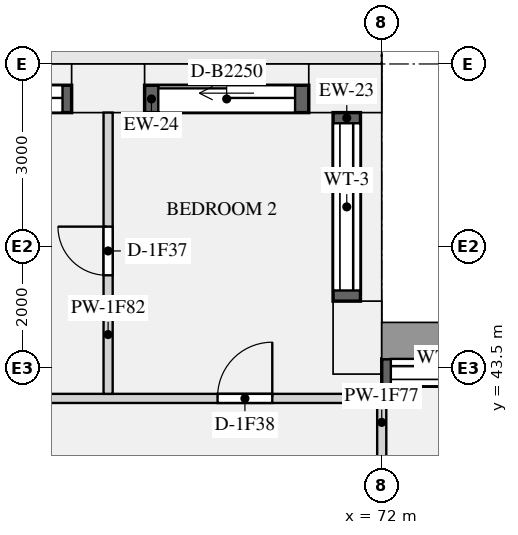
"""IFC4 building model, lengths in metres.
Left out: names, types, materials, properties, quantities, classifications, styles, units other than length and angle.
Written with IfcOpenShell. Run it as: python <this file> out.ifc"""

import sys

from ifc_helpers import new_model, si_unit, direction, frame, frame_2d, origin, origin_2d, place, context, subcontext, project, spatial, rectangle, extrude, element, fill, save


model = new_model("IFC4")
c1 = context("Model", 3, precision=1e-05, world=origin(), true_north=direction((0.0, 1.0)))
c2 = subcontext(c1, "Body", "Model", "MODEL_VIEW")
j1 = project(units=[si_unit("LENGTHUNIT", "METRE"), si_unit("PLANEANGLEUNIT", "RADIAN")], contexts=[c1])
p1 = place(None, origin())
s1 = spatial("IfcSite", under=j1, at=p1, CompositionType="ELEMENT")
p2 = place(p1, origin())
s2 = spatial("IfcBuilding", under=s1, at=p2, CompositionType="ELEMENT")
p3 = place(p2, frame((0.0, 0.0, 60.45)))
s3 = spatial("IfcBuildingStorey", under=s2, at=p3, CompositionType="ELEMENT", Elevation=60.45)
for number, where, z_axis, x_axis in (
    (1, (71.6, 44.0, 0.0), (0.0, 0.0, 1.0), (0.0, 1.0, 0.0)),
    (2, (71.4, 48.1, 0.0), (0.0, 0.0, 1.0), (-1.0, 0.0, 0.0)),
    (3, (67.5, 48.1, 0.0), (0.0, 0.0, 1.0), (-1.0, 0.0, 0.0)),
):
    element("IfcColumn", number, at=place(p3, frame(where, z_axis=z_axis, x_axis=x_axis)), inside=s3, PredefinedType="USERDEFINED", context=c2, shape_type="SweptSolid", body=[
        extrude(rectangle(XDim=1.2, YDim=0.8, at=origin_2d()), origin(), (0.0, 0.0, 1.0), 3.15),
    ])
p4 = place(p3, frame((75.3, 43.425, 0.9), z_axis=(0.0, 0.0, 1.0), x_axis=(-1.0, 0.0, 0.0)))
e4 = element("IfcWall", 4, at=p4, inside=s3, PredefinedType="SOLIDWALL", context=c2, shape_type="SweptSolid", body=[
    extrude(rectangle(XDim=3.3, YDim=0.45, at=frame_2d((1.65, 0.0))), origin(), (0.0, 0.0, 1.0), 1.93),
])
p5 = place(p4, frame((0.15, 0.0, 0.15)))
e5 = element("IfcOpeningElement", 5, at=p5, cuts=e4, PredefinedType="OPENING", context=c2, shape_type="SweptSolid", body=[
    extrude(rectangle(XDim=3.0, YDim=1.5, at=frame_2d((1.5, 0.75))), frame((0.0, 0.235, 0.0), z_axis=(0.0, -1.0, 0.0), x_axis=(1.0, 0.0, 0.0)), (0.0, 0.0, 1.0), 0.47),
])
p6 = place(p3, frame((71.425, 44.6, 0.9), z_axis=(0.0, 0.0, 1.0), x_axis=(0.0, 1.0, 0.0)))
e6 = element("IfcWall", 6, at=p6, inside=s3, PredefinedType="SOLIDWALL", context=c2, shape_type="SweptSolid", body=[
    extrude(rectangle(XDim=3.1, YDim=0.45, at=frame_2d((1.55, 0.0))), origin(), (0.0, 0.0, 1.0), 1.93),
])
p7 = place(p6, frame((0.175, 0.0, 0.15)))
e7 = element("IfcOpeningElement", 7, at=p7, cuts=e6, PredefinedType="OPENING", context=c2, shape_type="SweptSolid", body=[
    extrude(rectangle(XDim=2.75, YDim=1.5, at=frame_2d((1.375, 0.75))), frame((0.0, 0.235, 0.0), z_axis=(0.0, -1.0, 0.0), x_axis=(1.0, 0.0, 0.0)), (0.0, 0.0, 1.0), 0.47),
])
p8 = place(p3, frame((70.8, 47.925, 0.0), z_axis=(0.0, 0.0, 1.0), x_axis=(-1.0, 0.0, 0.0)))
e8 = element("IfcWall", 8, at=p8, inside=s3, PredefinedType="SOLIDWALL", context=c2, shape_type="SweptSolid", body=[
    extrude(rectangle(XDim=2.7, YDim=0.45, at=frame_2d((1.35, 0.0))), origin(), (0.0, 0.0, 1.0), 2.83),
])
p9 = place(p8, frame((0.225, 0.0, 0.0)))
e9 = element("IfcOpeningElement", 9, at=p9, cuts=e8, PredefinedType="OPENING", context=c2, shape_type="SweptSolid", body=[
    extrude(rectangle(XDim=2.25, YDim=2.3, at=frame_2d((1.125, 1.15))), frame((0.0, 0.235, 0.0), z_axis=(0.0, -1.0, 0.0), x_axis=(1.0, 0.0, 0.0)), (0.0, 0.0, 1.0), 0.47),
])
p10 = place(p3, frame((66.9, 47.925, 0.0), z_axis=(0.0, 0.0, 1.0), x_axis=(-1.0, 0.0, 0.0)))
e10 = element("IfcWall", 10, at=p10, inside=s3, PredefinedType="SOLIDWALL", context=c2, shape_type="SweptSolid", body=[
    extrude(rectangle(XDim=3.3, YDim=0.45, at=frame_2d((1.65, 0.0))), origin(), (0.0, 0.0, 1.0), 2.83),
])
p11 = place(p10, frame((0.15, 0.0, 0.0)))
e11 = element("IfcOpeningElement", 11, at=p11, cuts=e10, PredefinedType="OPENING", context=c2, shape_type="SweptSolid", body=[
    extrude(rectangle(XDim=3.0, YDim=2.3, at=frame_2d((1.5, 1.15))), frame((0.0, 0.235, 0.0), z_axis=(0.0, -1.0, 0.0), x_axis=(1.0, 0.0, 0.0)), (0.0, 0.0, 1.0), 0.47),
])
p12 = place(p3, frame((53.925, 43.0, 0.0), z_axis=(0.0, 0.0, 1.0), x_axis=(1.0, 0.0, 0.0)))
e12 = element("IfcWall", 12, at=p12, inside=s3, PredefinedType="PARTITIONING", context=c2, shape_type="SweptSolid", body=[
    extrude(rectangle(XDim=18.0, YDim=0.15, at=frame_2d((9.0, 0.0))), origin(), (0.0, 0.0, 1.0), 2.83),
])
p13 = place(p12, frame((15.375, 0.0, 0.0)))
e13 = element("IfcOpeningElement", 13, at=p13, cuts=e12, PredefinedType="OPENING", context=c2, shape_type="SweptSolid", body=[
    extrude(rectangle(XDim=0.9, YDim=2.1, at=frame_2d((0.45, 1.05))), frame((0.0, 0.085, 0.0), z_axis=(0.0, -1.0, 0.0), x_axis=(1.0, 0.0, 0.0)), (0.0, 0.0, 1.0), 0.17),
])
p14 = place(p12, frame((4.125, 0.0, 0.0)))
e14 = element("IfcOpeningElement", 14, at=p14, cuts=e12, PredefinedType="OPENING", context=c2, shape_type="SweptSolid", body=[
    extrude(rectangle(XDim=0.9, YDim=2.1, at=frame_2d((0.45, 1.05))), frame((0.0, 0.085, 0.0), z_axis=(0.0, -1.0, 0.0), x_axis=(1.0, 0.0, 0.0)), (0.0, 0.0, 1.0), 0.17),
])
p15 = place(p3, frame((72.0, 40.2, 0.0), z_axis=(0.0, 0.0, 1.0), x_axis=(0.0, 1.0, 0.0)))
e15 = element("IfcWall", 15, at=p15, inside=s3, PredefinedType="PARTITIONING", context=c2, shape_type="SweptSolid", body=[
    extrude(rectangle(XDim=3.0, YDim=0.15, at=frame_2d((1.5, 0.0))), origin(), (0.0, 0.0, 1.0), 2.83),
])
p16 = place(p15, frame((0.912, 0.0, 0.0)))
e16 = element("IfcOpeningElement", 16, at=p16, cuts=e15, PredefinedType="OPENING", context=c2, shape_type="SweptSolid", body=[
    extrude(rectangle(XDim=0.9, YDim=2.1, at=frame_2d((0.45, 1.05))), frame((0.0, 0.085, 0.0), z_axis=(0.0, -1.0, 0.0), x_axis=(1.0, 0.0, 0.0)), (0.0, 0.0, 1.0), 0.17),
])
p17 = place(p3, frame((67.5, 43.075, 0.0), z_axis=(0.0, 0.0, 1.0), x_axis=(0.0, 1.0, 0.0)))
e17 = element("IfcWall", 17, at=p17, inside=s3, PredefinedType="PARTITIONING", context=c2, shape_type="SweptSolid", body=[
    extrude(rectangle(XDim=4.625, YDim=0.15, at=frame_2d((2.312, 0.0))), origin(), (0.0, 0.0, 1.0), 2.83),
])
p18 = place(p17, frame((1.95, 0.0, 0.0)))
e18 = element("IfcOpeningElement", 18, at=p18, cuts=e17, PredefinedType="OPENING", context=c2, shape_type="SweptSolid", body=[
    extrude(rectangle(XDim=0.8, YDim=2.1, at=frame_2d((0.4, 1.05))), frame((0.0, 0.085, 0.0), z_axis=(0.0, -1.0, 0.0), x_axis=(1.0, 0.0, 0.0)), (0.0, 0.0, 1.0), 0.17),
])
p19 = place(p5, origin())
e19 = element("IfcWindow", 19, at=p19, inside=s3, PartitioningType="SINGLE_PANEL", PredefinedType="WINDOW", context=c2, shape_type="SweptSolid", body=[
    extrude(rectangle(XDim=3.0, YDim=1.5, at=frame_2d((1.5, 0.75))), frame((0.0, -0.065, 0.0), z_axis=(0.0, -1.0, 0.0), x_axis=(1.0, 0.0, 0.0)), (0.0, 0.0, 1.0), 0.06),
])
fill(e5, e19)
p20 = place(p7, origin())
e20 = element("IfcWindow", 20, at=p20, inside=s3, PartitioningType="SINGLE_PANEL", PredefinedType="WINDOW", context=c2, shape_type="SweptSolid", body=[
    extrude(rectangle(XDim=2.75, YDim=1.5, at=frame_2d((1.375, 0.75))), frame((0.0, -0.065, 0.0), z_axis=(0.0, -1.0, 0.0), x_axis=(1.0, 0.0, 0.0)), (0.0, 0.0, 1.0), 0.06),
])
fill(e7, e20)
p21 = place(p9, origin())
e21 = element("IfcDoor", 21, at=p21, inside=s3, OperationType="SLIDING_TO_LEFT", PredefinedType="DOOR", context=c2, shape_type="SweptSolid", body=[
    extrude(rectangle(XDim=2.25, YDim=2.3, at=frame_2d((1.125, 1.15))), frame((0.0, -0.07, 0.0), z_axis=(0.0, -1.0, 0.0), x_axis=(1.0, 0.0, 0.0)), (0.0, 0.0, 1.0), 0.05),
])
fill(e9, e21)
p22 = place(p11, origin())
e22 = element("IfcDoor", 22, at=p22, inside=s3, OperationType="SLIDING_TO_LEFT", PredefinedType="DOOR", context=c2, shape_type="SweptSolid", body=[
    extrude(rectangle(XDim=3.0, YDim=2.3, at=frame_2d((1.5, 1.15))), frame((0.0, -0.07, 0.0), z_axis=(0.0, -1.0, 0.0), x_axis=(1.0, 0.0, 0.0)), (0.0, 0.0, 1.0), 0.05),
])
fill(e11, e22)
p23 = place(p18, origin())
e23 = element("IfcDoor", 23, at=p23, inside=s3, OperationType="SINGLE_SWING_RIGHT", PredefinedType="DOOR", context=c2, shape_type="SweptSolid", body=[
    extrude(rectangle(XDim=0.8, YDim=2.1, at=frame_2d((0.4, 1.05))), frame((0.0, 0.025, 0.0), z_axis=(0.0, -1.0, 0.0), x_axis=(1.0, 0.0, 0.0)), (0.0, 0.0, 1.0), 0.05),
])
fill(e18, e23)
p24 = place(p13, origin())
e24 = element("IfcDoor", 24, at=p24, inside=s3, OperationType="SINGLE_SWING_RIGHT", PredefinedType="DOOR", context=c2, shape_type="SweptSolid", body=[
    extrude(rectangle(XDim=0.9, YDim=2.1, at=frame_2d((0.45, 1.05))), frame((0.0, 0.025, 0.0), z_axis=(0.0, -1.0, 0.0), x_axis=(1.0, 0.0, 0.0)), (0.0, 0.0, 1.0), 0.05),
])
fill(e13, e24)
save(model, sys.argv[1])
